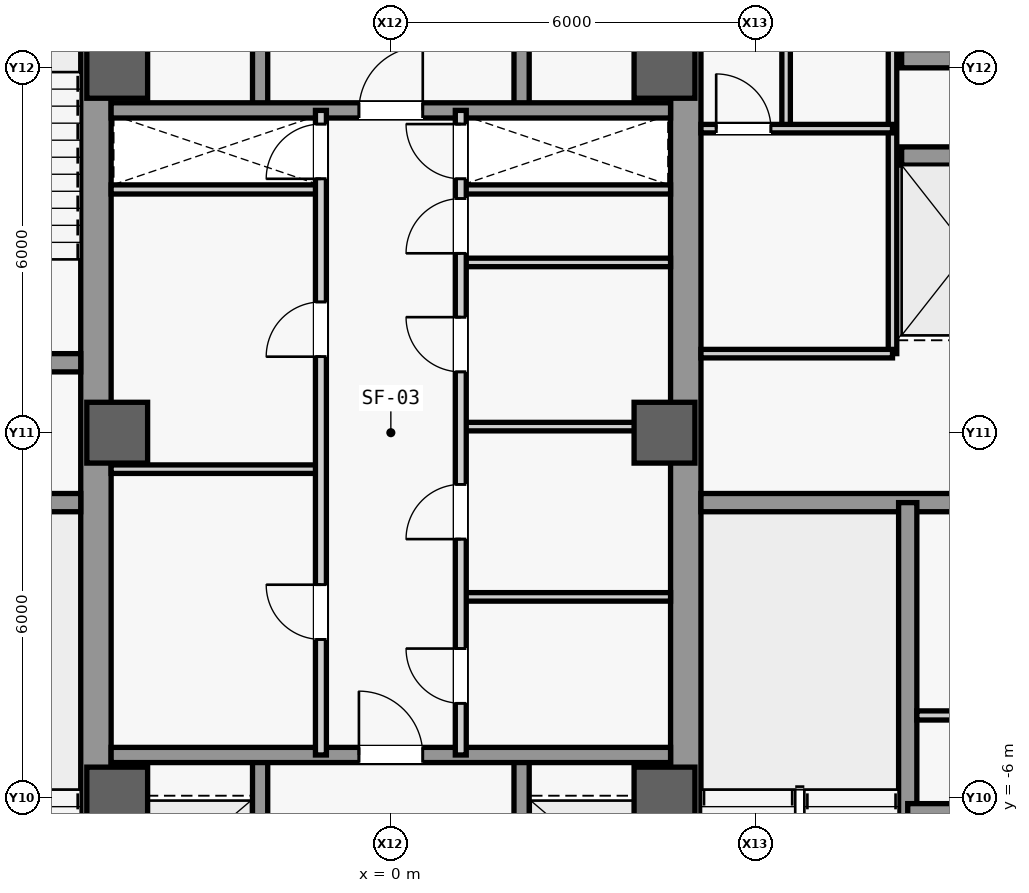
"""IFC4 building model, lengths in metres.
Left out: names, types, materials, properties, quantities, classifications, styles, units other than length and angle.
Written with IfcOpenShell. Run it as: python <this file> out.ifc"""

import sys

from ifc_helpers import new_model, si_unit, direction, frame, frame_2d, origin, origin_2d, place, context, subcontext, project, spatial, rectangle, extrude, source, transform, mapped, element, fill, save


model = new_model("IFC4")
c1 = context("Model", 3, precision=1e-05, world=origin(), true_north=direction((0.0, 1.0)))
c2 = subcontext(c1, "Body", "Model", "MODEL_VIEW")
j1 = project(units=[si_unit("LENGTHUNIT", "METRE"), si_unit("PLANEANGLEUNIT", "RADIAN")], contexts=[c1])
p1 = place(None, origin())
s1 = spatial("IfcSite", under=j1, at=p1, CompositionType="ELEMENT")
p2 = place(p1, origin())
s2 = spatial("IfcBuilding", under=s1, at=p2, CompositionType="ELEMENT")
p3 = place(p2, frame((0.0, 0.0, 116.0)))
s3 = spatial("IfcBuildingStorey", under=s2, at=p3, CompositionType="ELEMENT", Elevation=116.0)
m1 = source(origin(), c2, "Body", "SweptSolid", [
    extrude(rectangle(XDim=21.4, YDim=0.5, at=frame_2d((10.7, 0.0))), origin(), (0.0, 0.0, 1.0), 3.84),
])
for number, where, z_axis, x_axis in (
    (1, (-4.85, -10.7, 0.0), (0.0, 0.0, 1.0), (0.0, 1.0, 0.0)),
    (2, (4.85, -10.7, 0.0), (0.0, 0.0, 1.0), (0.0, 1.0, 0.0)),
):
    element("IfcWall", number, at=place(p3, frame(where, z_axis=z_axis, x_axis=x_axis)), inside=s3, PredefinedType="SHEAR", context=c2, shape_type="MappedRepresentation", body=[
        mapped(m1, transform((0.0, 0.0, 0.0), scale=1.0)),
    ])
m2 = source(origin(), c2, "Body", "SweptSolid", [
    extrude(rectangle(XDim=5.6, YDim=0.3, at=frame_2d((2.8, 0.0))), origin(), (0.0, 0.0, 1.0), 3.84),
])
for number, where, z_axis, x_axis in (
    (3, (-10.7, -1.15, 0.0), (0.0, 0.0, 1.0), (1.0, 0.0, 0.0)),
    (4, (-10.7, 1.15, 0.0), (0.0, 0.0, 1.0), (1.0, 0.0, 0.0)),
    (5, (5.1, -1.15, 0.0), (0.0, 0.0, 1.0), (1.0, 0.0, 0.0)),
):
    element("IfcWall", number, at=place(p3, frame(where, z_axis=z_axis, x_axis=x_axis)), inside=s3, PredefinedType="SHEAR", context=c2, shape_type="MappedRepresentation", body=[
        mapped(m2, transform((0.0, 0.0, 0.0), scale=1.0)),
    ])
m3 = source(origin(), c2, "Body", "SweptSolid", [
    extrude(rectangle(XDim=1.0, YDim=1.0, at=origin_2d()), origin(), (0.0, 0.0, 1.0), 4.1),
])
for number, where, z_axis, x_axis in (
    (6, (-4.5, -6.0, 0.0), (0.0, 0.0, 1.0), (1.0, 0.0, 0.0)),
    (7, (-4.5, 0.0, 0.0), (0.0, 0.0, 1.0), (1.0, 0.0, 0.0)),
    (8, (-4.5, 6.0, 0.0), (0.0, 0.0, 1.0), (1.0, 0.0, 0.0)),
    (9, (4.5, -6.0, 0.0), (0.0, 0.0, 1.0), (1.0, 0.0, 0.0)),
    (10, (4.5, 0.0, 0.0), (0.0, 0.0, 1.0), (1.0, 0.0, 0.0)),
    (11, (4.5, 6.0, 0.0), (0.0, 0.0, 1.0), (1.0, 0.0, 0.0)),
):
    element("IfcColumn", number, at=place(p3, frame(where, z_axis=z_axis, x_axis=x_axis)), inside=s3, PredefinedType="COLUMN", context=c2, shape_type="MappedRepresentation", body=[
        mapped(m3, transform((0.0, 0.0, 0.0), scale=1.0)),
    ])
m4 = source(origin(), c2, "Body", "SweptSolid", [
    extrude(rectangle(XDim=7.8, YDim=0.3, at=frame_2d((3.9, 0.0))), origin(), (0.0, 0.0, 1.0), 3.84),
])
p4 = place(p3, frame((8.5, -8.95, 0.0), z_axis=(0.0, 0.0, 1.0), x_axis=(0.0, 1.0, 0.0)))
e12 = element("IfcWall", 12, at=p4, inside=s3, PredefinedType="SHEAR", context=c2, shape_type="MappedRepresentation", body=[
    mapped(m4, transform((0.0, 0.0, 0.0), scale=1.0)),
])
m5 = source(origin(), c2, "Body", "SweptSolid", [
    extrude(rectangle(XDim=2.2, YDim=0.3, at=frame_2d((1.1, 0.0))), origin(), (0.0, 0.0, 1.0), 3.84),
])
p5 = place(p3, frame((8.5, -6.25, 0.0), z_axis=(0.0, 0.0, 1.0), x_axis=(1.0, 0.0, 0.0)))
e13 = element("IfcWall", 13, at=p5, inside=s3, PredefinedType="SHEAR", context=c2, shape_type="MappedRepresentation", body=[
    mapped(m5, transform((0.0, 0.0, 0.0), scale=1.0)),
])
m6 = source(origin(), c2, "Body", "SweptSolid", [
    extrude(rectangle(XDim=2.3, YDim=0.3, at=frame_2d((1.15, 0.0))), origin(), (0.0, 0.0, 1.0), 3.84),
])
for number, where, z_axis, x_axis in (
    (14, (8.4, 4.55, 0.0), (0.0, 0.0, 1.0), (1.0, 0.0, 0.0)),
    (15, (8.4, 6.15, 0.0), (0.0, 0.0, 1.0), (1.0, 0.0, 0.0)),
):
    element("IfcWall", number, at=place(p3, frame(where, z_axis=z_axis, x_axis=x_axis)), inside=s3, PredefinedType="SHEAR", context=c2, shape_type="MappedRepresentation", body=[
        mapped(m6, transform((0.0, 0.0, 0.0), scale=1.0)),
    ])
m7 = source(origin(), c2, "Body", "SweptSolid", [
    extrude(rectangle(XDim=2.05, YDim=0.15, at=frame_2d((1.025, 0.0))), origin(), (0.0, 0.0, 1.0), 3.84),
])
p6 = place(p3, frame((8.65, -4.65, 0.0), z_axis=(0.0, 0.0, 1.0), x_axis=(1.0, 0.0, 0.0)))
e16 = element("IfcWall", 16, at=p6, inside=s3, PredefinedType="PARTITIONING", context=c2, shape_type="MappedRepresentation", body=[
    mapped(m7, transform((0.0, 0.0, 0.0), scale=1.0)),
])
m8 = source(origin(), c2, "Body", "SweptSolid", [
    extrude(rectangle(XDim=9.4, YDim=0.14, at=frame_2d((4.7, 0.0))), origin(), (0.0, 0.0, 1.0), 3.84),
])
p7 = place(p3, frame((8.25, 1.3, 0.0), z_axis=(0.0, 0.0, 1.0), x_axis=(0.0, 1.0, 0.0)))
e17 = element("IfcWall", 17, at=p7, inside=s3, PredefinedType="PARTITIONING", context=c2, shape_type="MappedRepresentation", body=[
    mapped(m8, transform((0.0, 0.0, 0.0), scale=1.0)),
])
m9 = source(origin(), c2, "Body", "SweptSolid", [
    extrude(rectangle(XDim=3.15, YDim=0.14, at=frame_2d((1.575, 0.0))), origin(), (0.0, 0.0, 1.0), 3.84),
])
p8 = place(p3, frame((5.1, 1.3, 0.0), z_axis=(0.0, 0.0, 1.0), x_axis=(1.0, 0.0, 0.0)))
e18 = element("IfcWall", 18, at=p8, inside=s3, PredefinedType="PARTITIONING", context=c2, shape_type="MappedRepresentation", body=[
    mapped(m9, transform((0.0, 0.0, 0.0), scale=1.0)),
])
m10 = source(origin(), c2, "Body", "SweptSolid", [
    extrude(rectangle(XDim=5.7, YDim=0.14, at=frame_2d((2.85, 0.0))), origin(), (0.0, 0.0, 1.0), 3.84),
])
p9 = place(p3, frame((6.5, 5.0, 0.0), z_axis=(0.0, 0.0, 1.0), x_axis=(0.0, 1.0, 0.0)))
e19 = element("IfcWall", 19, at=p9, inside=s3, PredefinedType="PARTITIONING", context=c2, shape_type="MappedRepresentation", body=[
    mapped(m10, transform((0.0, 0.0, 0.0), scale=1.0)),
])
m11 = source(origin(), c2, "Body", "SweptSolid", [
    extrude(rectangle(XDim=0.9, YDim=2.15, at=frame_2d((0.45, 1.075))), frame((0.0, 0.08, 0.0), z_axis=(0.0, -1.0, 0.0), x_axis=(1.0, 0.0, 0.0)), (0.0, 0.0, 1.0), 0.16),
])
p10 = place(p9, frame((2.05, 0.0, 0.0)))
e20 = element("IfcOpeningElement", 20, at=p10, cuts=e19, PredefinedType="OPENING", context=c2, shape_type="MappedRepresentation", body=[
    mapped(m11, transform((0.0, 0.0, 0.0), scale=1.0)),
])
p11 = place(p3, frame((5.1, 5.0, 0.0), z_axis=(0.0, 0.0, 1.0), x_axis=(1.0, 0.0, 0.0)))
e21 = element("IfcWall", 21, at=p11, inside=s3, PredefinedType="PARTITIONING", context=c2, shape_type="MappedRepresentation", body=[
    mapped(m9, transform((0.0, 0.0, 0.0), scale=1.0)),
])
p12 = place(p11, frame((0.25, 0.0, 0.0)))
e22 = element("IfcOpeningElement", 22, at=p12, cuts=e21, PredefinedType="OPENING", context=c2, shape_type="MappedRepresentation", body=[
    mapped(m11, transform((0.0, 0.0, 0.0), scale=1.0)),
])
m12 = source(origin(), c2, "Body", "SweptSolid", [
    extrude(rectangle(XDim=3.45, YDim=0.15, at=frame_2d((1.725, 0.0))), origin(), (0.0, 0.0, 1.0), 3.84),
])
for number, where, z_axis, x_axis in (
    (23, (-4.6, 4.0, 0.0), (0.0, 0.0, 1.0), (1.0, 0.0, 0.0)),
    (24, (1.15, 4.0, 0.0), (0.0, 0.0, 1.0), (1.0, 0.0, 0.0)),
):
    element("IfcWall", number, at=place(p3, frame(where, z_axis=z_axis, x_axis=x_axis)), inside=s3, PredefinedType="PARTITIONING", context=c2, shape_type="MappedRepresentation", body=[
        mapped(m12, transform((0.0, 0.0, 0.0), scale=1.0)),
    ])
m13 = source(origin(), c2, "Body", "SweptSolid", [
    extrude(rectangle(XDim=5.4, YDim=0.25, at=frame_2d((2.7, 0.0))), origin(), (0.0, 0.0, 1.0), 3.84),
])
p13 = place(p3, frame((-2.15, -10.7, 0.0), z_axis=(0.0, 0.0, 1.0), x_axis=(0.0, 1.0, 0.0)))
e25 = element("IfcWall", 25, at=p13, inside=s3, PredefinedType="SHEAR", context=c2, shape_type="MappedRepresentation", body=[
    mapped(m13, transform((0.0, 0.0, 0.0), scale=1.0)),
])
m14 = source(origin(), c2, "Body", "SweptSolid", [
    extrude(rectangle(XDim=1.2, YDim=2.3, at=frame_2d((0.6, 1.15))), frame((0.0, 0.135, 0.0), z_axis=(0.0, -1.0, 0.0), x_axis=(1.0, 0.0, 0.0)), (0.0, 0.0, 1.0), 0.27),
])
p14 = place(p13, frame((0.9, 0.0, 0.0)))
e26 = element("IfcOpeningElement", 26, at=p14, cuts=e25, PredefinedType="OPENING", context=c2, shape_type="MappedRepresentation", body=[
    mapped(m14, transform((0.0, 0.0, 0.0), scale=1.0)),
])
p15 = place(p13, frame((3.2, 0.0, 0.0)))
e27 = element("IfcOpeningElement", 27, at=p15, cuts=e25, PredefinedType="OPENING", context=c2, shape_type="MappedRepresentation", body=[
    mapped(m14, transform((0.0, 0.0, 0.0), scale=1.0)),
])
p16 = place(p3, frame((2.15, -10.7, 0.0), z_axis=(0.0, 0.0, 1.0), x_axis=(0.0, 1.0, 0.0)))
e28 = element("IfcWall", 28, at=p16, inside=s3, PredefinedType="SHEAR", context=c2, shape_type="MappedRepresentation", body=[
    mapped(m13, transform((0.0, 0.0, 0.0), scale=1.0)),
])
p17 = place(p16, frame((0.9, 0.0, 0.0)))
e29 = element("IfcOpeningElement", 29, at=p17, cuts=e28, PredefinedType="OPENING", context=c2, shape_type="MappedRepresentation", body=[
    mapped(m14, transform((0.0, 0.0, 0.0), scale=1.0)),
])
p18 = place(p16, frame((3.2, 0.0, 0.0)))
e30 = element("IfcOpeningElement", 30, at=p18, cuts=e28, PredefinedType="OPENING", context=c2, shape_type="MappedRepresentation", body=[
    mapped(m14, transform((0.0, 0.0, 0.0), scale=1.0)),
])
m15 = source(origin(), c2, "Body", "SweptSolid", [
    extrude(rectangle(XDim=9.2, YDim=0.25, at=frame_2d((4.6, 0.0))), origin(), (0.0, 0.0, 1.0), 3.84),
])
p19 = place(p3, frame((-4.6, -5.3, 0.0), z_axis=(0.0, 0.0, 1.0), x_axis=(1.0, 0.0, 0.0)))
e31 = element("IfcWall", 31, at=p19, inside=s3, PredefinedType="SHEAR", context=c2, shape_type="MappedRepresentation", body=[
    mapped(m15, transform((0.0, 0.0, 0.0), scale=1.0)),
])
m16 = source(origin(), c2, "Body", "SweptSolid", [
    extrude(rectangle(XDim=1.05, YDim=2.2, at=frame_2d((0.525, 1.1))), frame((0.0, 0.135, 0.0), z_axis=(0.0, -1.0, 0.0), x_axis=(1.0, 0.0, 0.0)), (0.0, 0.0, 1.0), 0.27),
])
p20 = place(p19, frame((4.075, 0.0, 0.0)))
e32 = element("IfcOpeningElement", 32, at=p20, cuts=e31, PredefinedType="OPENING", context=c2, shape_type="MappedRepresentation", body=[
    mapped(m16, transform((0.0, 0.0, 0.0), scale=1.0)),
])
for number, where, z_axis, x_axis in (
    (33, (-2.15, 5.3, 0.0), (0.0, 0.0, 1.0), (0.0, 1.0, 0.0)),
    (34, (2.15, 5.3, 0.0), (0.0, 0.0, 1.0), (0.0, 1.0, 0.0)),
):
    element("IfcWall", number, at=place(p3, frame(where, z_axis=z_axis, x_axis=x_axis)), inside=s3, PredefinedType="SHEAR", context=c2, shape_type="MappedRepresentation", body=[
        mapped(m13, transform((0.0, 0.0, 0.0), scale=1.0)),
    ])
p21 = place(p3, frame((-4.6, 5.3, 0.0), z_axis=(0.0, 0.0, 1.0), x_axis=(1.0, 0.0, 0.0)))
e35 = element("IfcWall", 35, at=p21, inside=s3, PredefinedType="SHEAR", context=c2, shape_type="MappedRepresentation", body=[
    mapped(m15, transform((0.0, 0.0, 0.0), scale=1.0)),
])
p22 = place(p21, frame((4.075, 0.0, 0.0)))
e36 = element("IfcOpeningElement", 36, at=p22, cuts=e35, PredefinedType="OPENING", context=c2, shape_type="MappedRepresentation", body=[
    mapped(m16, transform((0.0, 0.0, 0.0), scale=1.0)),
])
m17 = source(origin(), c2, "Body", "SweptSolid", [
    extrude(rectangle(XDim=3.45, YDim=0.14, at=frame_2d((1.725, 0.0))), origin(), (0.0, 0.0, 1.0), 3.84),
])
p23 = place(p3, frame((-4.6, -0.6, 0.0), z_axis=(0.0, 0.0, 1.0), x_axis=(1.0, 0.0, 0.0)))
e37 = element("IfcWall", 37, at=p23, inside=s3, PredefinedType="PARTITIONING", context=c2, shape_type="MappedRepresentation", body=[
    mapped(m17, transform((0.0, 0.0, 0.0), scale=1.0)),
])
m18 = source(origin(), c2, "Body", "SweptSolid", [
    extrude(rectangle(XDim=10.6, YDim=0.18, at=frame_2d((5.3, 0.0))), origin(), (0.0, 0.0, 1.0), 3.84),
])
p24 = place(p3, frame((-1.15, -5.3, 0.0), z_axis=(0.0, 0.0, 1.0), x_axis=(0.0, 1.0, 0.0)))
e38 = element("IfcWall", 38, at=p24, inside=s3, PredefinedType="PARTITIONING", context=c2, shape_type="MappedRepresentation", body=[
    mapped(m18, transform((0.0, 0.0, 0.0), scale=1.0)),
])
m19 = source(origin(), c2, "Body", "SweptSolid", [
    extrude(rectangle(XDim=0.9, YDim=2.15, at=frame_2d((0.45, 1.075))), frame((0.0, 0.1, 0.0), z_axis=(0.0, -1.0, 0.0), x_axis=(1.0, 0.0, 0.0)), (0.0, 0.0, 1.0), 0.2),
])
p25 = place(p24, frame((1.9, 0.0, 0.0)))
e39 = element("IfcOpeningElement", 39, at=p25, cuts=e38, PredefinedType="OPENING", context=c2, shape_type="MappedRepresentation", body=[
    mapped(m19, transform((0.0, 0.0, 0.0), scale=1.0)),
])
p26 = place(p24, frame((6.55, 0.0, 0.0)))
e40 = element("IfcOpeningElement", 40, at=p26, cuts=e38, PredefinedType="OPENING", context=c2, shape_type="MappedRepresentation", body=[
    mapped(m19, transform((0.0, 0.0, 0.0), scale=1.0)),
])
p27 = place(p24, frame((9.475, 0.0, 0.0)))
e41 = element("IfcOpeningElement", 41, at=p27, cuts=e38, PredefinedType="OPENING", context=c2, shape_type="MappedRepresentation", body=[
    mapped(m19, transform((0.0, 0.0, 0.0), scale=1.0)),
])
p28 = place(p3, frame((1.15, -2.7, 0.0), z_axis=(0.0, 0.0, 1.0), x_axis=(1.0, 0.0, 0.0)))
e42 = element("IfcWall", 42, at=p28, inside=s3, PredefinedType="PARTITIONING", context=c2, shape_type="MappedRepresentation", body=[
    mapped(m17, transform((0.0, 0.0, 0.0), scale=1.0)),
])
m20 = source(origin(), c2, "Body", "SweptSolid", [
    extrude(rectangle(XDim=3.45, YDim=0.14, at=frame_2d((1.725, 0.0))), origin(), (0.0, 0.0, 1.0), 3.145),
])
p29 = place(p3, frame((1.15, 0.1, 0.0), z_axis=(0.0, 0.0, 1.0), x_axis=(1.0, 0.0, 0.0)))
e43 = element("IfcWall", 43, at=p29, inside=s3, PredefinedType="PARTITIONING", context=c2, shape_type="MappedRepresentation", body=[
    mapped(m20, transform((0.0, 0.0, 0.0), scale=1.0)),
])
p30 = place(p3, frame((1.15, 2.8, 0.0), z_axis=(0.0, 0.0, 1.0), x_axis=(1.0, 0.0, 0.0)))
e44 = element("IfcWall", 44, at=p30, inside=s3, PredefinedType="PARTITIONING", context=c2, shape_type="MappedRepresentation", body=[
    mapped(m17, transform((0.0, 0.0, 0.0), scale=1.0)),
])
p31 = place(p3, frame((1.15, -5.3, 0.0), z_axis=(0.0, 0.0, 1.0), x_axis=(0.0, 1.0, 0.0)))
e45 = element("IfcWall", 45, at=p31, inside=s3, PredefinedType="PARTITIONING", context=c2, shape_type="MappedRepresentation", body=[
    mapped(m18, transform((0.0, 0.0, 0.0), scale=1.0)),
])
p32 = place(p31, frame((0.85, 0.0, 0.0)))
e46 = element("IfcOpeningElement", 46, at=p32, cuts=e45, PredefinedType="OPENING", context=c2, shape_type="MappedRepresentation", body=[
    mapped(m19, transform((0.0, 0.0, 0.0), scale=1.0)),
])
p33 = place(p31, frame((3.55, 0.0, 0.0)))
e47 = element("IfcOpeningElement", 47, at=p33, cuts=e45, PredefinedType="OPENING", context=c2, shape_type="MappedRepresentation", body=[
    mapped(m19, transform((0.0, 0.0, 0.0), scale=1.0)),
])
p34 = place(p31, frame((6.3, 0.0, 0.0)))
e48 = element("IfcOpeningElement", 48, at=p34, cuts=e45, PredefinedType="OPENING", context=c2, shape_type="MappedRepresentation", body=[
    mapped(m19, transform((0.0, 0.0, 0.0), scale=1.0)),
])
p35 = place(p31, frame((8.25, 0.0, 0.0)))
e49 = element("IfcOpeningElement", 49, at=p35, cuts=e45, PredefinedType="OPENING", context=c2, shape_type="MappedRepresentation", body=[
    mapped(m19, transform((0.0, 0.0, 0.0), scale=1.0)),
])
p36 = place(p31, frame((9.475, 0.0, 0.0)))
e50 = element("IfcOpeningElement", 50, at=p36, cuts=e45, PredefinedType="OPENING", context=c2, shape_type="MappedRepresentation", body=[
    mapped(m19, transform((0.0, 0.0, 0.0), scale=1.0)),
])
m21 = source(origin(), c2, "Body", "SweptSolid", [
    extrude(rectangle(XDim=0.9, YDim=2.15, at=frame_2d((0.45, 1.075))), frame((0.0, 0.025, 0.0), z_axis=(0.0, -1.0, 0.0), x_axis=(1.0, 0.0, 0.0)), (0.0, 0.0, 1.0), 0.05),
])
p37 = place(p12, origin())
e51 = element("IfcDoor", 51, at=p37, inside=s3, OperationType="SINGLE_SWING_LEFT", PredefinedType="DOOR", context=c2, shape_type="MappedRepresentation", body=[
    mapped(m21, transform((0.0, 0.0, 0.0), scale=1.0)),
])
fill(e22, e51)
m22 = source(origin(), c2, "Body", "SweptSolid", [
    extrude(rectangle(XDim=1.05, YDim=2.2, at=frame_2d((0.525, 1.1))), frame((0.0, 0.025, 0.0), z_axis=(0.0, -1.0, 0.0), x_axis=(1.0, 0.0, 0.0)), (0.0, 0.0, 1.0), 0.05),
])
p38 = place(p20, origin())
e52 = element("IfcDoor", 52, at=p38, inside=s3, OperationType="SINGLE_SWING_LEFT", PredefinedType="DOOR", context=c2, shape_type="MappedRepresentation", body=[
    mapped(m22, transform((0.0, 0.0, 0.0), scale=1.0)),
])
fill(e32, e52)
p39 = place(p22, origin())
e53 = element("IfcDoor", 53, at=p39, inside=s3, OperationType="SINGLE_SWING_RIGHT", PredefinedType="DOOR", context=c2, shape_type="MappedRepresentation", body=[
    mapped(m22, transform((0.0, 0.0, 0.0), scale=1.0)),
])
fill(e36, e53)
p40 = place(p25, origin())
e54 = element("IfcDoor", 54, at=p40, inside=s3, OperationType="SINGLE_SWING_RIGHT", PredefinedType="DOOR", context=c2, shape_type="MappedRepresentation", body=[
    mapped(m21, transform((0.0, 0.0, 0.0), scale=1.0)),
])
fill(e39, e54)
p41 = place(p26, origin())
e55 = element("IfcDoor", 55, at=p41, inside=s3, OperationType="SINGLE_SWING_LEFT", PredefinedType="DOOR", context=c2, shape_type="MappedRepresentation", body=[
    mapped(m21, transform((0.0, 0.0, 0.0), scale=1.0)),
])
fill(e40, e55)
p42 = place(p32, origin())
e56 = element("IfcDoor", 56, at=p42, inside=s3, OperationType="SINGLE_SWING_RIGHT", PredefinedType="DOOR", context=c2, shape_type="MappedRepresentation", body=[
    mapped(m21, transform((0.0, 0.0, 0.0), scale=1.0)),
])
fill(e46, e56)
p43 = place(p33, origin())
e57 = element("IfcDoor", 57, at=p43, inside=s3, OperationType="SINGLE_SWING_LEFT", PredefinedType="DOOR", context=c2, shape_type="MappedRepresentation", body=[
    mapped(m21, transform((0.0, 0.0, 0.0), scale=1.0)),
])
fill(e47, e57)
p44 = place(p34, origin())
e58 = element("IfcDoor", 58, at=p44, inside=s3, OperationType="SINGLE_SWING_RIGHT", PredefinedType="DOOR", context=c2, shape_type="MappedRepresentation", body=[
    mapped(m21, transform((0.0, 0.0, 0.0), scale=1.0)),
])
fill(e48, e58)
p45 = place(p35, origin())
e59 = element("IfcDoor", 59, at=p45, inside=s3, OperationType="SINGLE_SWING_LEFT", PredefinedType="DOOR", context=c2, shape_type="MappedRepresentation", body=[
    mapped(m21, transform((0.0, 0.0, 0.0), scale=1.0)),
])
fill(e49, e59)
p46 = place(p27, origin())
e60 = element("IfcDoor", 60, at=p46, inside=s3, OperationType="SINGLE_SWING_LEFT", PredefinedType="DOOR", context=c2, shape_type="MappedRepresentation", body=[
    mapped(m21, transform((0.0, 0.0, 0.0), scale=1.0)),
])
fill(e41, e60)
p47 = place(p36, origin())
e61 = element("IfcDoor", 61, at=p47, inside=s3, OperationType="SINGLE_SWING_RIGHT", PredefinedType="DOOR", context=c2, shape_type="MappedRepresentation", body=[
    mapped(m21, transform((0.0, 0.0, 0.0), scale=1.0)),
])
fill(e50, e61)
save(model, sys.argv[1])
